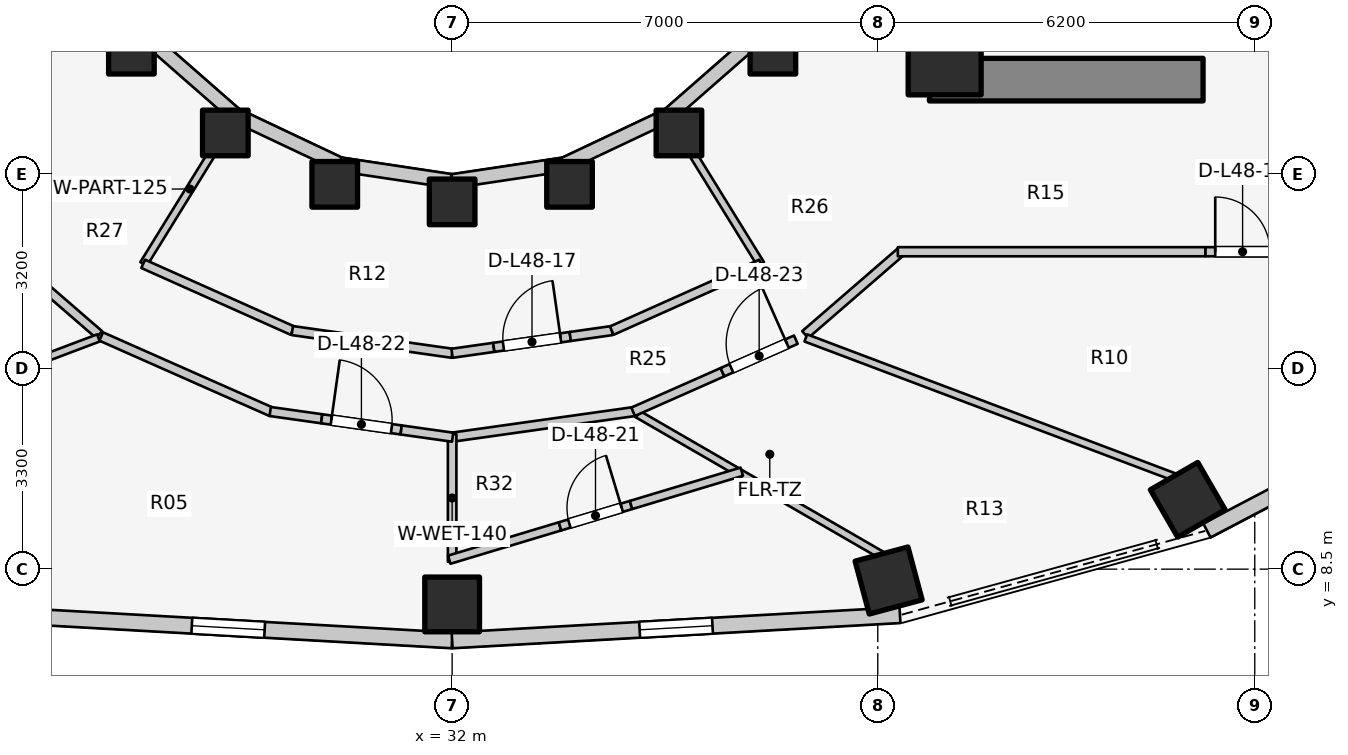
"""IFC4 building model, lengths in metres.
Left out: names, types, materials, properties, quantities, classifications, styles, units other than length and angle.
Written with IfcOpenShell. Run it as: python <this file> out.ifc"""

import sys

from ifc_helpers import new_model, si_unit, direction, frame, frame_2d, origin, origin_2d, place, context, subcontext, project, spatial, rectangle, extrude, element, fill, save


model = new_model("IFC4")
c1 = context("Model", 3, precision=1e-05, world=origin(), true_north=direction((0.0, 1.0)))
c2 = subcontext(c1, "Body", "Model", "MODEL_VIEW")
j1 = project(units=[si_unit("LENGTHUNIT", "METRE"), si_unit("PLANEANGLEUNIT", "RADIAN")], contexts=[c1])
p1 = place(None, origin())
s1 = spatial("IfcSite", under=j1, at=p1, CompositionType="ELEMENT")
p2 = place(p1, origin())
s2 = spatial("IfcBuilding", under=s1, at=p2, CompositionType="ELEMENT")
p3 = place(p2, frame((0.0, 0.0, 159.1)))
s3 = spatial("IfcBuildingStorey", under=s2, at=p3, CompositionType="ELEMENT", Elevation=159.1)
p4 = place(p3, frame((39.85, 16.55, 0.0), z_axis=(0.0, 0.0, 1.0), x_axis=(1.0, 0.0, 0.0)))
e1 = element("IfcWall", 1, at=p4, inside=s3, PredefinedType="SHEAR", context=c2, shape_type="SweptSolid", body=[
    extrude(rectangle(XDim=4.5, YDim=0.7, at=frame_2d((2.25, 0.0))), origin(), (0.0, 0.0, 1.0), 3.1),
])
p5 = place(p3, frame((40.1, 16.9, 0.0), z_axis=(0.0, 0.0, 1.0), x_axis=(1.0, 0.0, 0.0)))
e2 = element("IfcColumn", 2, at=p5, inside=s3, PredefinedType="COLUMN", context=c2, shape_type="SweptSolid", body=[
    extrude(rectangle(XDim=1.2, YDim=1.2, at=origin_2d()), origin(), (0.0, 0.0, 1.0), 3.1),
])
for number, where, z_axis, x_axis in (
    (3, (26.725, 17.018, 0.0), (0.0, 0.0, 1.0), (1.0, 0.0, 0.0)),
    (4, (28.27, 15.673, 0.0), (0.0, 0.0, 1.0), (1.0, 0.0, 0.0)),
    (5, (30.069, 14.828, 0.0), (0.0, 0.0, 1.0), (1.0, 0.0, 0.0)),
    (6, (32.0, 14.54, 0.0), (0.0, 0.0, 1.0), (1.0, 0.0, 0.0)),
):
    element("IfcColumn", number, at=place(p3, frame(where, z_axis=z_axis, x_axis=x_axis)), inside=s3, PredefinedType="COLUMN", context=c2, shape_type="SweptSolid", body=[
        extrude(rectangle(XDim=0.75, YDim=0.75, at=origin_2d()), origin(), (0.0, 0.0, 1.0), 3.1),
    ])
p6 = place(p3, frame((32.0, 7.92, 0.0), z_axis=(0.0, 0.0, 1.0), x_axis=(0.0, -1.0, 0.0)))
e7 = element("IfcColumn", 7, at=p6, inside=s3, PredefinedType="COLUMN", context=c2, shape_type="SweptSolid", body=[
    extrude(rectangle(XDim=0.9, YDim=0.9, at=origin_2d()), origin(), (0.0, 0.0, 1.0), 3.1),
])
p7 = place(p3, frame((33.931, 14.828, 0.0), z_axis=(0.0, 0.0, 1.0), x_axis=(1.0, 0.0, 0.0)))
e8 = element("IfcColumn", 8, at=p7, inside=s3, PredefinedType="COLUMN", context=c2, shape_type="SweptSolid", body=[
    extrude(rectangle(XDim=0.75, YDim=0.75, at=origin_2d()), origin(), (0.0, 0.0, 1.0), 3.1),
])
p8 = place(p3, frame((39.178, 8.313, 0.0), z_axis=(0.0, 0.0, 1.0), x_axis=(0.258819045103, -0.965925826289, 0.0)))
e9 = element("IfcColumn", 9, at=p8, inside=s3, PredefinedType="COLUMN", context=c2, shape_type="SweptSolid", body=[
    extrude(rectangle(XDim=0.9, YDim=0.9, at=origin_2d()), origin(), (0.0, 0.0, 1.0), 3.1),
])
p9 = place(p3, frame((35.73, 15.673, 0.0), z_axis=(0.0, 0.0, 1.0), x_axis=(1.0, 0.0, 0.0)))
e10 = element("IfcColumn", 10, at=p9, inside=s3, PredefinedType="COLUMN", context=c2, shape_type="SweptSolid", body=[
    extrude(rectangle(XDim=0.75, YDim=0.75, at=origin_2d()), origin(), (0.0, 0.0, 1.0), 3.1),
])
p10 = place(p3, frame((44.098, 9.641, 0.0), z_axis=(0.0, 0.0, 1.0), x_axis=(0.5, -0.866025403784, 0.0)))
e11 = element("IfcColumn", 11, at=p10, inside=s3, PredefinedType="COLUMN", context=c2, shape_type="SweptSolid", body=[
    extrude(rectangle(XDim=0.9, YDim=0.9, at=origin_2d()), origin(), (0.0, 0.0, 1.0), 3.1),
])
p11 = place(p3, frame((37.275, 17.018, 0.0), z_axis=(0.0, 0.0, 1.0), x_axis=(1.0, 0.0, 0.0)))
e12 = element("IfcColumn", 12, at=p11, inside=s3, PredefinedType="COLUMN", context=c2, shape_type="SweptSolid", body=[
    extrude(rectangle(XDim=0.75, YDim=0.75, at=origin_2d()), origin(), (0.0, 0.0, 1.0), 3.1),
])
p12 = place(p3, frame((26.965, 17.258, 0.0), z_axis=(0.0, 0.0, 1.0), x_axis=(0.752576694707, -0.658504607869, 0.0)))
e13 = element("IfcWall", 13, at=p12, inside=s3, PredefinedType="STANDARD", context=c2, shape_type="SweptSolid", body=[
    extrude(rectangle(XDim=1.959, YDim=0.23, at=frame_2d((0.98, 0.0))), origin(), (0.0, 0.0, 1.0), 1.22),
])
p13 = place(p3, frame((28.44, 15.968, 0.0), z_axis=(0.0, 0.0, 1.0), x_axis=(0.904179699603, -0.427152280606, 0.0)))
e14 = element("IfcWall", 14, at=p13, inside=s3, PredefinedType="STANDARD", context=c2, shape_type="SweptSolid", body=[
    extrude(rectangle(XDim=1.899, YDim=0.23, at=frame_2d((0.95, 0.0))), origin(), (0.0, 0.0, 1.0), 1.22),
])
for number, where, z_axis, x_axis in (
    (15, (30.157, 15.157, 0.0), (0.0, 0.0, 1.0), (0.989, -0.149, 0.0)),
    (16, (32.0, 14.88, 0.0), (0.0, 0.0, 1.0), (0.989, 0.149, 0.0)),
):
    element("IfcWall", number, at=place(p3, frame(where, z_axis=z_axis, x_axis=x_axis)), inside=s3, PredefinedType="STANDARD", context=c2, shape_type="SweptSolid", body=[
        extrude(rectangle(XDim=1.864, YDim=0.23, at=frame_2d((0.932, 0.0))), origin(), (0.0, 0.0, 1.0), 1.22),
    ])
p14 = place(p3, frame((33.843, 15.157, 0.0), z_axis=(0.0, 0.0, 1.0), x_axis=(0.904179699603, 0.427152280606, 0.0)))
e17 = element("IfcWall", 17, at=p14, inside=s3, PredefinedType="STANDARD", context=c2, shape_type="SweptSolid", body=[
    extrude(rectangle(XDim=1.899, YDim=0.23, at=frame_2d((0.95, 0.0))), origin(), (0.0, 0.0, 1.0), 1.22),
])
p15 = place(p3, frame((35.56, 15.968, 0.0), z_axis=(0.0, 0.0, 1.0), x_axis=(0.752576694707, 0.658504607869, 0.0)))
e18 = element("IfcWall", 18, at=p15, inside=s3, PredefinedType="STANDARD", context=c2, shape_type="SweptSolid", body=[
    extrude(rectangle(XDim=1.959, YDim=0.23, at=frame_2d((0.98, 0.0))), origin(), (0.0, 0.0, 1.0), 1.22),
])
p16 = place(p3, frame((24.635, 7.743, 0.0), z_axis=(0.0, 0.0, 1.0), x_axis=(0.998417906562, -0.056228852534, 0.0)))
e19 = element("IfcWall", 19, at=p16, inside=s3, PredefinedType="STANDARD", context=c2, shape_type="SweptSolid", body=[
    extrude(rectangle(XDim=7.377, YDim=0.26, at=frame_2d((3.688, 0.0))), origin(), (0.0, 0.0, 1.0), 1.22),
])
p17 = place(p16, frame((3.088, 0.0, 0.15)))
e20 = element("IfcOpeningElement", 20, at=p17, cuts=e19, PredefinedType="OPENING", context=c2, shape_type="SweptSolid", body=[
    extrude(rectangle(XDim=1.2, YDim=0.9, at=frame_2d((0.6, 0.45))), frame((0.0, 0.14, 0.0), z_axis=(0.0, -1.0, 0.0), x_axis=(1.0, 0.0, 0.0)), (0.0, 0.0, 1.0), 0.28),
])
p18 = place(p3, frame((32.0, 7.329, 0.0), z_axis=(0.0, 0.0, 1.0), x_axis=(0.998417906562, 0.056228852534, 0.0)))
e21 = element("IfcWall", 21, at=p18, inside=s3, PredefinedType="STANDARD", context=c2, shape_type="SweptSolid", body=[
    extrude(rectangle(XDim=7.377, YDim=0.26, at=frame_2d((3.688, 0.0))), origin(), (0.0, 0.0, 1.0), 1.22),
])
p19 = place(p18, frame((3.088, 0.0, 0.15)))
e22 = element("IfcOpeningElement", 22, at=p19, cuts=e21, PredefinedType="OPENING", context=c2, shape_type="SweptSolid", body=[
    extrude(rectangle(XDim=1.2, YDim=0.9, at=frame_2d((0.6, 0.45))), frame((0.0, 0.14, 0.0), z_axis=(0.0, -1.0, 0.0), x_axis=(1.0, 0.0, 0.0)), (0.0, 0.0, 1.0), 0.28),
])
p20 = place(p3, frame((44.413, 9.137, 0.0), z_axis=(0.0, 0.0, 1.0), x_axis=(0.885660265226, 0.464333818065, 0.0)))
e23 = element("IfcWall", 23, at=p20, inside=s3, PredefinedType="STANDARD", context=c2, shape_type="SweptSolid", body=[
    extrude(rectangle(XDim=4.354, YDim=0.26, at=frame_2d((2.177, 0.0))), origin(), (0.0, 0.0, 1.0), 1.22),
])
for number, where, z_axis, x_axis in (
    (24, (26.193, 12.358, 0.0), (0.0, 0.0, 1.0), (-0.756, 0.655, 0.0)),
    (25, (37.807, 12.358, 0.0), (0.0, 0.0, 1.0), (0.756, 0.655, 0.0)),
):
    element("IfcWall", number, at=place(p3, frame(where, z_axis=z_axis, x_axis=x_axis)), inside=s3, PredefinedType="PARTITIONING", context=c2, shape_type="SweptSolid", body=[
        extrude(rectangle(XDim=2.111, YDim=0.15, at=frame_2d((1.055, 0.0))), origin(), (0.0, 0.0, 1.0), 2.019),
    ])
p21 = place(p3, frame((39.33, 13.72, 0.0), z_axis=(0.0, 0.0, 1.0), x_axis=(1.0, 0.0, 0.0)))
e26 = element("IfcWall", 26, at=p21, inside=s3, PredefinedType="PARTITIONING", context=c2, shape_type="SweptSolid", body=[
    extrude(rectangle(XDim=5.06, YDim=0.15, at=frame_2d((2.53, 0.0))), origin(), (0.0, 0.0, 1.0), 2.019),
])
p22 = place(p3, frame((44.39, 13.72, 0.0), z_axis=(0.0, 0.0, 1.0), x_axis=(1.0, 0.0, 0.0)))
e27 = element("IfcWall", 27, at=p22, inside=s3, PredefinedType="PARTITIONING", context=c2, shape_type="SweptSolid", body=[
    extrude(rectangle(XDim=1.22, YDim=0.15, at=frame_2d((0.61, 0.0))), origin(), (0.0, 0.0, 1.0), 2.575),
])
p23 = place(p22, frame((0.16, 0.0, 0.0)))
e28 = element("IfcOpeningElement", 28, at=p23, cuts=e27, PredefinedType="OPENING", context=c2, shape_type="SweptSolid", body=[
    extrude(rectangle(XDim=0.9, YDim=2.1, at=frame_2d((0.45, 1.05))), frame((0.0, 0.085, 0.0), z_axis=(0.0, -1.0, 0.0), x_axis=(1.0, 0.0, 0.0)), (0.0, 0.0, 1.0), 0.17),
])
for number, where, z_axis, x_axis in (
    (29, (28.45, 15.985, 0.0), (0.0, 0.0, 1.0), (-0.526, -0.851, 0.0)),
    (30, (35.55, 15.985, 0.0), (0.0, 0.0, 1.0), (0.526, -0.851, 0.0)),
):
    element("IfcWall", number, at=place(p3, frame(where, z_axis=z_axis, x_axis=x_axis)), inside=s3, PredefinedType="PARTITIONING", context=c2, shape_type="SweptSolid", body=[
        extrude(rectangle(XDim=2.901, YDim=0.125, at=frame_2d((1.451, 0.0))), origin(), (0.0, 0.0, 1.0), 2.019),
    ])
p24 = place(p3, frame((26.919, 13.521, 0.0), z_axis=(0.0, 0.0, 1.0), x_axis=(0.912888568324, -0.408208845842, 0.0)))
e31 = element("IfcWall", 31, at=p24, inside=s3, PredefinedType="PARTITIONING", context=c2, shape_type="SweptSolid", body=[
    extrude(rectangle(XDim=2.69, YDim=0.15, at=frame_2d((1.345, 0.0))), origin(), (0.0, 0.0, 1.0), 2.019),
])
p25 = place(p3, frame((29.371, 12.424, 0.0), z_axis=(0.0, 0.0, 1.0), x_axis=(0.990066775667, -0.1405979364, 0.0)))
e32 = element("IfcWall", 32, at=p25, inside=s3, PredefinedType="PARTITIONING", context=c2, shape_type="SweptSolid", body=[
    extrude(rectangle(XDim=2.657, YDim=0.15, at=frame_2d((1.328, 0.0))), origin(), (0.0, 0.0, 1.0), 2.019),
])
p26 = place(p3, frame((31.998, 12.05, 0.0), z_axis=(0.0, 0.0, 1.0), x_axis=(0.990082845611, 0.140484728093, 0.0)))
e33 = element("IfcWall", 33, at=p26, inside=s3, PredefinedType="PARTITIONING", context=c2, shape_type="SweptSolid", body=[
    extrude(rectangle(XDim=0.693, YDim=0.15, at=frame_2d((0.347, 0.0))), origin(), (0.0, 0.0, 1.0), 2.019),
])
p27 = place(p3, frame((32.685, 12.147, 0.0), z_axis=(0.0, 0.0, 1.0), x_axis=(0.990049212475, 0.140721557967, 0.0)))
e34 = element("IfcWall", 34, at=p27, inside=s3, PredefinedType="PARTITIONING", context=c2, shape_type="SweptSolid", body=[
    extrude(rectangle(XDim=1.27, YDim=0.15, at=frame_2d((0.635, 0.0))), origin(), (0.0, 0.0, 1.0), 2.575),
])
p28 = place(p27, frame((0.16, 0.0, 0.0)))
e35 = element("IfcOpeningElement", 35, at=p28, cuts=e34, PredefinedType="OPENING", context=c2, shape_type="SweptSolid", body=[
    extrude(rectangle(XDim=0.95, YDim=2.1, at=frame_2d((0.475, 1.05))), frame((0.0, 0.085, 0.0), z_axis=(0.0, -1.0, 0.0), x_axis=(1.0, 0.0, 0.0)), (0.0, 0.0, 1.0), 0.17),
])
p29 = place(p3, frame((33.942, 12.326, 0.0), z_axis=(0.0, 0.0, 1.0), x_axis=(0.990082845611, 0.140484728093, 0.0)))
e36 = element("IfcWall", 36, at=p29, inside=s3, PredefinedType="PARTITIONING", context=c2, shape_type="SweptSolid", body=[
    extrude(rectangle(XDim=0.693, YDim=0.15, at=frame_2d((0.347, 0.0))), origin(), (0.0, 0.0, 1.0), 2.575),
])
p30 = place(p3, frame((34.625, 12.423, 0.0), z_axis=(0.0, 0.0, 1.0), x_axis=(0.912888568324, 0.408208845842, 0.0)))
e37 = element("IfcWall", 37, at=p30, inside=s3, PredefinedType="PARTITIONING", context=c2, shape_type="SweptSolid", body=[
    extrude(rectangle(XDim=2.69, YDim=0.15, at=frame_2d((1.345, 0.0))), origin(), (0.0, 0.0, 1.0), 2.019),
])
p31 = place(p3, frame((26.184, 12.302, 0.0), z_axis=(0.0, 0.0, 1.0), x_axis=(-0.935601484289, -0.353057874288, 0.0)))
e38 = element("IfcWall", 38, at=p31, inside=s3, PredefinedType="PARTITIONING", context=c2, shape_type="SweptSolid", body=[
    extrude(rectangle(XDim=6.484, YDim=0.125, at=frame_2d((3.242, 0.0))), origin(), (0.0, 0.0, 1.0), 1.22),
])
p32 = place(p3, frame((35.032, 11.062, 0.0), z_axis=(0.0, 0.0, 1.0), x_axis=(0.865627016774, -0.500689392568, 0.0)))
e39 = element("IfcWall", 39, at=p32, inside=s3, PredefinedType="PARTITIONING", context=c2, shape_type="SweptSolid", body=[
    extrude(rectangle(XDim=4.662, YDim=0.125, at=frame_2d((2.331, 0.0))), origin(), (0.0, 0.0, 1.0), 1.22),
])
p33 = place(p3, frame((37.816, 12.302, 0.0), z_axis=(0.0, 0.0, 1.0), x_axis=(0.935601484289, -0.353057874288, 0.0)))
e40 = element("IfcWall", 40, at=p33, inside=s3, PredefinedType="PARTITIONING", context=c2, shape_type="SweptSolid", body=[
    extrude(rectangle(XDim=6.484, YDim=0.125, at=frame_2d((3.242, 0.0))), origin(), (0.0, 0.0, 1.0), 1.22),
])
p34 = place(p3, frame((31.95, 10.663, 0.0), z_axis=(0.0, 0.0, 1.0), x_axis=(0.990234434447, 0.139412211929, 0.0)))
e41 = element("IfcWall", 41, at=p34, inside=s3, PredefinedType="PARTITIONING", context=c2, shape_type="SweptSolid", body=[
    extrude(rectangle(XDim=3.114, YDim=0.15, at=frame_2d((1.557, 0.0))), origin(), (0.0, 0.0, 1.0), 2.019),
])
p35 = place(p3, frame((32.0, 10.72, 0.0), z_axis=(0.0, 0.0, 1.0), x_axis=(0.0, -1.0, 0.0)))
e42 = element("IfcWall", 42, at=p35, inside=s3, PredefinedType="PLUMBINGWALL", context=c2, shape_type="SweptSolid", body=[
    extrude(rectangle(XDim=2.1, YDim=0.14, at=frame_2d((1.05, 0.0))), origin(), (0.0, 0.0, 1.0), 2.019),
])
p36 = place(p3, frame((31.952, 8.656, 0.0), z_axis=(0.0, 0.0, 1.0), x_axis=(0.957589285646, 0.288136703696, 0.0)))
e43 = element("IfcWall", 43, at=p36, inside=s3, PredefinedType="PLUMBINGWALL", context=c2, shape_type="SweptSolid", body=[
    extrude(rectangle(XDim=1.902, YDim=0.14, at=frame_2d((0.951, 0.0))), origin(), (0.0, 0.0, 1.0), 2.019),
])
p37 = place(p3, frame((33.774, 9.204, 0.0), z_axis=(0.0, 0.0, 1.0), x_axis=(0.957578072853, 0.288173965498, 0.0)))
e44 = element("IfcWall", 44, at=p37, inside=s3, PredefinedType="PLUMBINGWALL", context=c2, shape_type="SweptSolid", body=[
    extrude(rectangle(XDim=1.22, YDim=0.14, at=frame_2d((0.61, 0.0))), origin(), (0.0, 0.0, 1.0), 2.575),
])
p38 = place(p37, frame((0.16, 0.0, 0.0)))
e45 = element("IfcOpeningElement", 45, at=p38, cuts=e44, PredefinedType="OPENING", context=c2, shape_type="SweptSolid", body=[
    extrude(rectangle(XDim=0.9, YDim=2.1, at=frame_2d((0.45, 1.05))), frame((0.0, 0.08, 0.0), z_axis=(0.0, -1.0, 0.0), x_axis=(1.0, 0.0, 0.0)), (0.0, 0.0, 1.0), 0.16),
])
p39 = place(p3, frame((34.942, 9.555, 0.0), z_axis=(0.0, 0.0, 1.0), x_axis=(0.957624692509, 0.288019006834, 0.0)))
e46 = element("IfcWall", 46, at=p39, inside=s3, PredefinedType="PLUMBINGWALL", context=c2, shape_type="SweptSolid", body=[
    extrude(rectangle(XDim=1.902, YDim=0.14, at=frame_2d((0.951, 0.0))), origin(), (0.0, 0.0, 1.0), 2.575),
])
p40 = place(p3, frame((26.228, 12.326, 0.0), z_axis=(0.0, 0.0, 1.0), x_axis=(0.914324470734, -0.404982422108, 0.0)))
e47 = element("IfcWall", 47, at=p40, inside=s3, PredefinedType="PARTITIONING", context=c2, shape_type="SweptSolid", body=[
    extrude(rectangle(XDim=3.058, YDim=0.15, at=frame_2d((1.529, 0.0))), origin(), (0.0, 0.0, 1.0), 2.019),
])
p41 = place(p3, frame((29.008, 11.092, 0.0), z_axis=(0.0, 0.0, 1.0), x_axis=(0.990238723834, -0.139381741342, 0.0)))
e48 = element("IfcWall", 48, at=p41, inside=s3, PredefinedType="PARTITIONING", context=c2, shape_type="SweptSolid", body=[
    extrude(rectangle(XDim=0.855, YDim=0.15, at=frame_2d((0.427, 0.0))), origin(), (0.0, 0.0, 1.0), 2.575),
])
p42 = place(p3, frame((29.854, 10.973, 0.0), z_axis=(0.0, 0.0, 1.0), x_axis=(0.990254187593, -0.139271834751, 0.0)))
e49 = element("IfcWall", 49, at=p42, inside=s3, PredefinedType="PARTITIONING", context=c2, shape_type="SweptSolid", body=[
    extrude(rectangle(XDim=1.32, YDim=0.15, at=frame_2d((0.66, 0.0))), origin(), (0.0, 0.0, 1.0), 2.575),
])
p43 = place(p42, frame((0.16, 0.0, 0.0)))
e50 = element("IfcOpeningElement", 50, at=p43, cuts=e49, PredefinedType="OPENING", context=c2, shape_type="SweptSolid", body=[
    extrude(rectangle(XDim=1.0, YDim=2.1, at=frame_2d((0.5, 1.05))), frame((0.0, 0.085, 0.0), z_axis=(0.0, -1.0, 0.0), x_axis=(1.0, 0.0, 0.0)), (0.0, 0.0, 1.0), 0.17),
])
p44 = place(p3, frame((31.162, 10.789, 0.0), z_axis=(0.0, 0.0, 1.0), x_axis=(0.990199264419, -0.139661794145, 0.0)))
e51 = element("IfcWall", 51, at=p44, inside=s3, PredefinedType="PARTITIONING", context=c2, shape_type="SweptSolid", body=[
    extrude(rectangle(XDim=0.855, YDim=0.15, at=frame_2d((0.427, 0.0))), origin(), (0.0, 0.0, 1.0), 2.019),
])
p45 = place(p3, frame((34.976, 11.088, 0.0), z_axis=(0.0, 0.0, 1.0), x_axis=(0.914324480558, 0.404982399928, 0.0)))
e52 = element("IfcWall", 52, at=p45, inside=s3, PredefinedType="PARTITIONING", context=c2, shape_type="SweptSolid", body=[
    extrude(rectangle(XDim=1.607, YDim=0.15, at=frame_2d((0.804, 0.0))), origin(), (0.0, 0.0, 1.0), 2.019),
])
p46 = place(p3, frame((36.446, 11.739, 0.0), z_axis=(0.0, 0.0, 1.0), x_axis=(0.914314172667, 0.405005671145, 0.0)))
e53 = element("IfcWall", 53, at=p46, inside=s3, PredefinedType="PARTITIONING", context=c2, shape_type="SweptSolid", body=[
    extrude(rectangle(XDim=1.32, YDim=0.15, at=frame_2d((0.66, 0.0))), origin(), (0.0, 0.0, 1.0), 2.16),
])
p47 = place(p46, frame((0.16, 0.0, 0.0)))
e54 = element("IfcOpeningElement", 54, at=p47, cuts=e53, PredefinedType="OPENING", context=c2, shape_type="SweptSolid", body=[
    extrude(rectangle(XDim=1.0, YDim=2.1, at=frame_2d((0.5, 1.05))), frame((0.0, 0.085, 0.0), z_axis=(0.0, -1.0, 0.0), x_axis=(1.0, 0.0, 0.0)), (0.0, 0.0, 1.0), 0.17),
])
p48 = place(p17, origin())
e55 = element("IfcWindow", 55, at=p48, inside=s3, PartitioningType="SINGLE_PANEL", PredefinedType="WINDOW", context=c2, shape_type="SweptSolid", body=[
    extrude(rectangle(XDim=1.2, YDim=0.9, at=frame_2d((0.6, 0.45))), frame((0.0, 0.03, 0.0), z_axis=(0.0, -1.0, 0.0), x_axis=(1.0, 0.0, 0.0)), (0.0, 0.0, 1.0), 0.06),
])
fill(e20, e55)
p49 = place(p19, origin())
e56 = element("IfcWindow", 56, at=p49, inside=s3, PartitioningType="SINGLE_PANEL", PredefinedType="WINDOW", context=c2, shape_type="SweptSolid", body=[
    extrude(rectangle(XDim=1.2, YDim=0.9, at=frame_2d((0.6, 0.45))), frame((0.0, 0.03, 0.0), z_axis=(0.0, -1.0, 0.0), x_axis=(1.0, 0.0, 0.0)), (0.0, 0.0, 1.0), 0.06),
])
fill(e22, e56)
p50 = place(p23, origin())
e57 = element("IfcDoor", 57, at=p50, inside=s3, OperationType="SINGLE_SWING_LEFT", PredefinedType="DOOR", context=c2, shape_type="SweptSolid", body=[
    extrude(rectangle(XDim=0.9, YDim=2.1, at=frame_2d((0.45, 1.05))), frame((0.0, 0.025, 0.0), z_axis=(0.0, -1.0, 0.0), x_axis=(1.0, 0.0, 0.0)), (0.0, 0.0, 1.0), 0.05),
])
fill(e28, e57)
p51 = place(p28, origin())
e58 = element("IfcDoor", 58, at=p51, inside=s3, OperationType="SINGLE_SWING_RIGHT", PredefinedType="DOOR", context=c2, shape_type="SweptSolid", body=[
    extrude(rectangle(XDim=0.95, YDim=2.1, at=frame_2d((0.475, 1.05))), frame((0.0, 0.025, 0.0), z_axis=(0.0, -1.0, 0.0), x_axis=(1.0, 0.0, 0.0)), (0.0, 0.0, 1.0), 0.05),
])
fill(e35, e58)
p52 = place(p38, origin())
e59 = element("IfcDoor", 59, at=p52, inside=s3, OperationType="SINGLE_SWING_RIGHT", PredefinedType="DOOR", context=c2, shape_type="SweptSolid", body=[
    extrude(rectangle(XDim=0.9, YDim=2.1, at=frame_2d((0.45, 1.05))), frame((0.0, 0.025, 0.0), z_axis=(0.0, -1.0, 0.0), x_axis=(1.0, 0.0, 0.0)), (0.0, 0.0, 1.0), 0.05),
])
fill(e45, e59)
p53 = place(p43, origin())
e60 = element("IfcDoor", 60, at=p53, inside=s3, OperationType="SINGLE_SWING_LEFT", PredefinedType="DOOR", context=c2, shape_type="SweptSolid", body=[
    extrude(rectangle(XDim=1.0, YDim=2.1, at=frame_2d((0.5, 1.05))), frame((0.0, 0.025, 0.0), z_axis=(0.0, -1.0, 0.0), x_axis=(1.0, 0.0, 0.0)), (0.0, 0.0, 1.0), 0.05),
])
fill(e50, e60)
p54 = place(p47, origin())
e61 = element("IfcDoor", 61, at=p54, inside=s3, OperationType="SINGLE_SWING_RIGHT", PredefinedType="DOOR", context=c2, shape_type="SweptSolid", body=[
    extrude(rectangle(XDim=1.0, YDim=2.1, at=frame_2d((0.5, 1.05))), frame((0.0, 0.025, 0.0), z_axis=(0.0, -1.0, 0.0), x_axis=(1.0, 0.0, 0.0)), (0.0, 0.0, 1.0), 0.05),
])
fill(e54, e61)
save(model, sys.argv[1])
